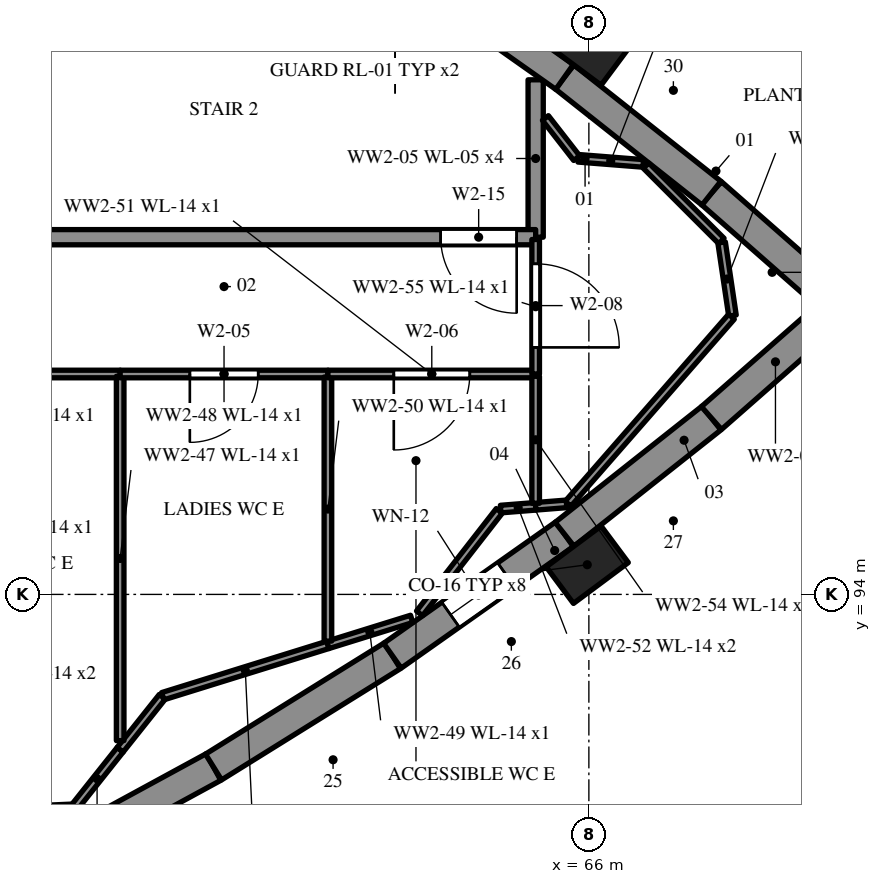
"""IFC4 building model, lengths in metres.
Left out: names, types, materials, properties, quantities, classifications, styles, units other than length and angle.
Written with IfcOpenShell. Run it as: python <this file> out.ifc"""

import sys

from ifc_helpers import new_model, si_unit, direction, frame, frame_2d, origin, origin_2d, place, context, subcontext, project, spatial, polyline, rectangle, outline, extrude, element, fill, save


model = new_model("IFC4")
c1 = context("Model", 3, precision=1e-05, world=origin(), true_north=direction((0.0, 1.0)))
c2 = subcontext(c1, "Body", "Model", "MODEL_VIEW")
j1 = project(units=[si_unit("LENGTHUNIT", "METRE"), si_unit("PLANEANGLEUNIT", "RADIAN")], contexts=[c1])
p1 = place(None, origin())
s1 = spatial("IfcSite", under=j1, at=p1, CompositionType="ELEMENT")
p2 = place(p1, origin())
s2 = spatial("IfcBuilding", under=s1, at=p2, CompositionType="ELEMENT")
p3 = place(p2, frame((0.0, 0.0, 10.2)))
s3 = spatial("IfcBuildingStorey", under=s2, at=p3, CompositionType="ELEMENT", Elevation=10.2)
p4 = place(p3, frame((65.3, 100.771, 0.0), z_axis=(0.0, 0.0, 1.0), x_axis=(0.0, -1.0, 0.0)))
e1 = element("IfcWall", 1, at=p4, inside=s3, PredefinedType="SHEAR", context=c2, shape_type="SweptSolid", body=[
    extrude(outline(polyline([(0.0, 0.0), (2.071, 0.0), (2.071, 5.912), (1.994, 5.842), (0.0, 4.028), (0.0, 0.0)])), frame((0.0, 0.1, 0.0), z_axis=(0.0, -1.0, 0.0), x_axis=(1.0, 0.0, 0.0)), (0.0, 0.0, 1.0), 0.2),
])
p5 = place(p3, frame((65.3, 98.7, 0.0), z_axis=(0.0, 0.0, 1.0), x_axis=(-1.0, 0.0, 0.0)))
e2 = element("IfcWall", 2, at=p5, inside=s3, PredefinedType="SHEAR", context=c2, shape_type="SweptSolid", body=[
    extrude(outline(polyline([(0.0, 0.0), (8.2, 0.0), (8.2, 9.679), (0.381, 5.875), (0.304, 5.911), (0.229, 5.899), (0.062, 5.861), (0.0, 5.845), (0.0, 0.0)])), frame((0.0, 0.1, 0.0), z_axis=(0.0, -1.0, 0.0), x_axis=(1.0, 0.0, 0.0)), (0.0, 0.0, 1.0), 0.2),
])
p6 = place(p5, frame((0.25, 0.0, 0.0)))
e3 = element("IfcOpeningElement", 3, at=p6, cuts=e2, PredefinedType="OPENING", context=c2, shape_type="SweptSolid", body=[
    extrude(rectangle(XDim=1.0, YDim=2.4, at=frame_2d((0.5, 1.2))), frame((0.0, 0.11, 0.0), z_axis=(0.0, -1.0, 0.0), x_axis=(1.0, 0.0, 0.0)), (0.0, 0.0, 1.0), 0.22),
])
p7 = place(p3, frame((58.627, 90.404, 0.0), z_axis=(0.0, 0.0, 1.0), x_axis=(0.878292493566, 0.478123724308, 0.0)))
e4 = element("IfcWall", 4, at=p7, inside=s3, PredefinedType="SOLIDWALL", context=c2, shape_type="SweptSolid", body=[
    extrude(outline(polyline([(0.0, 0.0), (2.772, 0.0), (2.772, 1.966), (2.734, 1.956), (2.673, 1.939), (0.0, 2.764), (0.0, 0.0)])), frame((0.0, 0.2, 0.0), z_axis=(0.0, -1.0, 0.0), x_axis=(1.0, 0.0, 0.0)), (0.0, 0.0, 1.0), 0.4),
])
p8 = place(p3, frame((61.062, 91.729, 0.0), z_axis=(0.0, 0.0, 1.0), x_axis=(0.84912946359, 0.528184772653, 0.0)))
e5 = element("IfcWall", 5, at=p8, inside=s3, PredefinedType="SOLIDWALL", context=c2, shape_type="SweptSolid", body=[
    extrude(outline(polyline([(0.0, 0.0), (2.772, 0.0), (2.772, 2.845), (2.451, 2.766), (0.525, 2.14), (0.0, 1.97), (0.0, 0.0)])), frame((0.0, 0.2, 0.0), z_axis=(0.0, -1.0, 0.0), x_axis=(1.0, 0.0, 0.0)), (0.0, 0.0, 1.0), 0.4),
])
p9 = place(p3, frame((63.415, 93.193, 0.0), z_axis=(0.0, 0.0, 1.0), x_axis=(0.817028877428, 0.576596751161, 0.0)))
e6 = element("IfcWall", 6, at=p9, inside=s3, PredefinedType="SOLIDWALL", context=c2, shape_type="SweptSolid", body=[
    extrude(outline(polyline([(0.0, 0.0), (2.772, 0.0), (2.772, 3.555), (2.744, 3.568), (2.603, 3.693), (2.462, 3.647), (0.367, 2.968), (0.0, 2.848), (0.0, 0.0)])), frame((0.0, 0.2, 0.0), z_axis=(0.0, -1.0, 0.0), x_axis=(1.0, 0.0, 0.0)), (0.0, 0.0, 1.0), 0.4),
])
p10 = place(p9, frame((0.936, 0.0, 1.6)))
e7 = element("IfcOpeningElement", 7, at=p10, cuts=e6, PredefinedType="OPENING", context=c2, shape_type="SweptSolid", body=[
    extrude(rectangle(XDim=0.9, YDim=0.6, at=frame_2d((0.45, 0.3))), frame((0.0, 0.21, 0.0), z_axis=(0.0, -1.0, 0.0), x_axis=(1.0, 0.0, 0.0)), (0.0, 0.0, 1.0), 0.42),
])
p11 = place(p3, frame((65.68, 94.792, 0.0), z_axis=(0.0, 0.0, 1.0), x_axis=(0.784278812541, 0.620408530082, 0.0)))
e8 = element("IfcWall", 8, at=p11, inside=s3, PredefinedType="SOLIDWALL", context=c2, shape_type="SweptSolid", body=[
    extrude(outline(polyline([(0.0, 0.0), (2.464, 0.0), (2.464, 2.651), (2.414, 2.669), (0.335, 3.428), (0.177, 3.486), (0.0, 3.551), (0.0, 0.0)])), frame((0.0, 0.2, 0.0), z_axis=(0.0, -1.0, 0.0), x_axis=(1.0, 0.0, 0.0)), (0.0, 0.0, 1.0), 0.4),
])
p12 = place(p3, frame((67.613, 96.32, 0.0), z_axis=(0.0, 0.0, 1.0), x_axis=(0.751212351098, 0.660060605973, 0.0)))
e9 = element("IfcWall", 9, at=p12, inside=s3, PredefinedType="SOLIDWALL", context=c2, shape_type="SweptSolid", body=[
    extrude(outline(polyline([(0.0, 0.0), (2.242, 0.0), (2.242, 1.751), (2.159, 1.784), (2.097, 1.809), (1.869, 1.901), (0.0, 2.647), (0.0, 0.0)])), frame((0.0, 0.2, 0.0), z_axis=(0.0, -1.0, 0.0), x_axis=(1.0, 0.0, 0.0)), (0.0, 0.0, 1.0), 0.4),
])
p13 = place(p3, frame((69.297, 97.8, 0.0), z_axis=(0.0, 0.0, 1.0), x_axis=(-0.751212351098, 0.660060605973, 0.0)))
e10 = element("IfcWall", 10, at=p13, inside=s3, PredefinedType="SOLIDWALL", context=c2, shape_type="SweptSolid", body=[
    extrude(outline(polyline([(0.0, 0.0), (2.242, 0.0), (2.242, 2.647), (2.202, 2.635), (0.372, 1.901), (0.145, 1.809), (0.083, 1.784), (0.0, 1.751), (0.0, 0.0)])), frame((0.0, 0.2, 0.0), z_axis=(0.0, -1.0, 0.0), x_axis=(1.0, 0.0, 0.0)), (0.0, 0.0, 1.0), 0.4),
])
p14 = place(p3, frame((67.613, 99.28, 0.0), z_axis=(0.0, 0.0, 1.0), x_axis=(-0.784278812541, 0.620408530082, 0.0)))
e11 = element("IfcWall", 11, at=p14, inside=s3, PredefinedType="SOLIDWALL", context=c2, shape_type="SweptSolid", body=[
    extrude(outline(polyline([(0.0, 0.0), (2.464, 0.0), (2.464, 3.551), (2.446, 3.544), (2.288, 3.486), (2.129, 3.428), (0.051, 2.669), (0.0, 2.651), (0.0, 0.0)])), frame((0.0, 0.2, 0.0), z_axis=(0.0, -1.0, 0.0), x_axis=(1.0, 0.0, 0.0)), (0.0, 0.0, 1.0), 0.4),
])
p15 = place(p3, frame((65.68, 100.809, 0.0), z_axis=(0.0, 0.0, 1.0), x_axis=(-0.817070367038, 0.57653795652, 0.0)))
e12 = element("IfcWall", 12, at=p15, inside=s3, PredefinedType="SOLIDWALL", context=c2, shape_type="SweptSolid", body=[
    extrude(outline(polyline([(0.0, 0.0), (2.772, 0.0), (2.772, 2.848), (2.406, 2.968), (0.311, 3.647), (0.169, 3.693), (0.0, 3.555), (0.0, 0.0)])), frame((0.0, 0.2, 0.0), z_axis=(0.0, -1.0, 0.0), x_axis=(1.0, 0.0, 0.0)), (0.0, 0.0, 1.0), 0.4),
])
for number, where, z_axis, x_axis in (
    (13, (65.979, 94.391, 0.0), (0.0, 0.0, 1.0), (0.802, 0.597, 0.0)),
    (14, (65.979, 101.209, 0.0), (0.0, 0.0, 1.0), (-0.802, 0.597, 0.0)),
):
    element("IfcColumn", number, at=place(p3, frame(where, z_axis=z_axis, x_axis=x_axis)), inside=s3, PredefinedType="PILASTER", context=c2, shape_type="SweptSolid", body=[
        extrude(rectangle(XDim=0.9, YDim=0.6, at=origin_2d()), origin(), (0.0, 0.0, 1.0), 2.507),
    ])
p16 = place(p3, frame((59.833, 91.956, 0.0), z_axis=(0.0, 0.0, 1.0), x_axis=(-0.622220537754, -0.78284200347, 0.0)))
e15 = element("IfcWall", 15, at=p16, inside=s3, PredefinedType="PARTITIONING", context=c2, shape_type="SweptSolid", body=[
    extrude(rectangle(XDim=0.976, YDim=0.1, at=frame_2d((0.488, 0.0))), origin(), (0.0, 0.0, 1.0), 2.5),
])
p17 = place(p3, frame((59.833, 96.9, 0.0), z_axis=(0.0, 0.0, 1.0), x_axis=(-1.0, 0.0, 0.0)))
e16 = element("IfcWall", 16, at=p17, inside=s3, PredefinedType="PARTITIONING", context=c2, shape_type="SweptSolid", body=[
    extrude(rectangle(XDim=2.733, YDim=0.1, at=frame_2d((1.367, 0.0))), origin(), (0.0, 0.0, 1.0), 2.5),
])
p18 = place(p17, frame((0.917, 0.0, 0.0)))
e17 = element("IfcOpeningElement", 17, at=p18, cuts=e16, PredefinedType="OPENING", context=c2, shape_type="SweptSolid", body=[
    extrude(rectangle(XDim=0.9, YDim=2.1, at=frame_2d((0.45, 1.05))), frame((0.0, 0.06, 0.0), z_axis=(0.0, -1.0, 0.0), x_axis=(1.0, 0.0, 0.0)), (0.0, 0.0, 1.0), 0.12),
])
p19 = place(p3, frame((62.567, 93.336, 0.0), z_axis=(0.0, 0.0, 1.0), x_axis=(-0.954993948464, -0.296625282802, 0.0)))
e18 = element("IfcWall", 18, at=p19, inside=s3, PredefinedType="PARTITIONING", context=c2, shape_type="SweptSolid", body=[
    extrude(rectangle(XDim=2.276, YDim=0.1, at=frame_2d((1.138, 0.0))), origin(), (0.0, 0.0, 1.0), 2.5),
])
p20 = place(p3, frame((60.387, 92.653, 0.0), z_axis=(0.0, 0.0, 1.0), x_axis=(-0.622584673897, -0.782552441584, 0.0)))
e19 = element("IfcWall", 19, at=p20, inside=s3, PredefinedType="PARTITIONING", context=c2, shape_type="SweptSolid", body=[
    extrude(rectangle(XDim=0.89, YDim=0.1, at=frame_2d((0.445, 0.0))), origin(), (0.0, 0.0, 1.0), 2.5),
])
p21 = place(p3, frame((59.833, 96.87, 0.0), z_axis=(0.0, 0.0, 1.0), x_axis=(0.0, -1.0, 0.0)))
e20 = element("IfcWall", 20, at=p21, inside=s3, PredefinedType="PARTITIONING", context=c2, shape_type="SweptSolid", body=[
    extrude(rectangle(XDim=4.794, YDim=0.1, at=frame_2d((2.397, 0.0))), origin(), (0.0, 0.0, 1.0), 2.5),
])
p22 = place(p3, frame((62.567, 96.9, 0.0), z_axis=(0.0, 0.0, 1.0), x_axis=(-1.0, 0.0, 0.0)))
e21 = element("IfcWall", 21, at=p22, inside=s3, PredefinedType="PARTITIONING", context=c2, shape_type="SweptSolid", body=[
    extrude(rectangle(XDim=2.733, YDim=0.1, at=frame_2d((1.367, 0.0))), origin(), (0.0, 0.0, 1.0), 2.5),
])
p23 = place(p22, frame((0.917, 0.0, 0.0)))
e22 = element("IfcOpeningElement", 22, at=p23, cuts=e21, PredefinedType="OPENING", context=c2, shape_type="SweptSolid", body=[
    extrude(rectangle(XDim=0.9, YDim=2.1, at=frame_2d((0.45, 1.05))), frame((0.0, 0.06, 0.0), z_axis=(0.0, -1.0, 0.0), x_axis=(1.0, 0.0, 0.0)), (0.0, 0.0, 1.0), 0.12),
])
p24 = place(p3, frame((63.669, 93.678, 0.0), z_axis=(0.0, 0.0, 1.0), x_axis=(-0.954998028135, -0.296612147861, 0.0)))
e23 = element("IfcWall", 23, at=p24, inside=s3, PredefinedType="PARTITIONING", context=c2, shape_type="SweptSolid", body=[
    extrude(rectangle(XDim=1.154, YDim=0.1, at=frame_2d((0.577, 0.0))), origin(), (0.0, 0.0, 1.0), 2.5),
])
p25 = place(p3, frame((62.567, 96.86, 0.0), z_axis=(0.0, 0.0, 1.0), x_axis=(0.0, -1.0, 0.0)))
e24 = element("IfcWall", 24, at=p25, inside=s3, PredefinedType="PARTITIONING", context=c2, shape_type="SweptSolid", body=[
    extrude(rectangle(XDim=3.474, YDim=0.1, at=frame_2d((1.737, 0.0))), origin(), (0.0, 0.0, 1.0), 2.5),
])
p26 = place(p3, frame((65.3, 96.9, 0.0), z_axis=(0.0, 0.0, 1.0), x_axis=(-1.0, 0.0, 0.0)))
e25 = element("IfcWall", 25, at=p26, inside=s3, PredefinedType="PARTITIONING", context=c2, shape_type="SweptSolid", body=[
    extrude(rectangle(XDim=2.733, YDim=0.1, at=frame_2d((1.367, 0.0))), origin(), (0.0, 0.0, 1.0), 2.5),
])
p27 = place(p26, frame((0.867, 0.0, 0.0)))
e26 = element("IfcOpeningElement", 26, at=p27, cuts=e25, PredefinedType="OPENING", context=c2, shape_type="SweptSolid", body=[
    extrude(rectangle(XDim=1.0, YDim=2.1, at=frame_2d((0.5, 1.05))), frame((0.0, 0.06, 0.0), z_axis=(0.0, -1.0, 0.0), x_axis=(1.0, 0.0, 0.0)), (0.0, 0.0, 1.0), 0.12),
])
p28 = place(p3, frame((65.3, 95.159, 0.0), z_axis=(0.0, 0.0, 1.0), x_axis=(-0.996890500496, -0.078799302161, 0.0)))
e27 = element("IfcWall", 27, at=p28, inside=s3, PredefinedType="PARTITIONING", context=c2, shape_type="SweptSolid", body=[
    extrude(rectangle(XDim=0.462, YDim=0.1, at=frame_2d((0.231, 0.0))), origin(), (0.0, 0.0, 1.0), 2.5),
])
p29 = place(p3, frame((64.822, 95.099, 0.0), z_axis=(0.0, 0.0, 1.0), x_axis=(-0.614326279965, -0.789052103314, 0.0)))
e28 = element("IfcWall", 28, at=p29, inside=s3, PredefinedType="PARTITIONING", context=c2, shape_type="SweptSolid", body=[
    extrude(rectangle(XDim=1.709, YDim=0.1, at=frame_2d((0.854, 0.0))), origin(), (0.0, 0.0, 1.0), 2.5),
])
p30 = place(p3, frame((66.752, 99.642, 0.0), z_axis=(0.0, 0.0, 1.0), x_axis=(0.707106781187, -0.707106781187, 0.0)))
e29 = element("IfcWall", 29, at=p30, inside=s3, PredefinedType="PARTITIONING", context=c2, shape_type="SweptSolid", body=[
    extrude(rectangle(XDim=1.402, YDim=0.1, at=frame_2d((0.701, 0.0))), origin(), (0.0, 0.0, 1.0), 2.5),
])
p31 = place(p3, frame((67.746, 98.631, 0.0), z_axis=(0.0, 0.0, 1.0), x_axis=(0.146903586496, -0.989150815738, 0.0)))
e30 = element("IfcWall", 30, at=p31, inside=s3, PredefinedType="PARTITIONING", context=c2, shape_type="SweptSolid", body=[
    extrude(rectangle(XDim=0.972, YDim=0.1, at=frame_2d((0.486, 0.0))), origin(), (0.0, 0.0, 1.0), 2.5),
])
p32 = place(p3, frame((67.876, 97.654, 0.0), z_axis=(0.0, 0.0, 1.0), x_axis=(-0.658039089544, -0.752983769169, 0.0)))
e31 = element("IfcWall", 31, at=p32, inside=s3, PredefinedType="PARTITIONING", context=c2, shape_type="SweptSolid", body=[
    extrude(rectangle(XDim=3.268, YDim=0.1, at=frame_2d((1.634, 0.0))), origin(), (0.0, 0.0, 1.0), 2.5),
])
p33 = place(p3, frame((65.706, 95.191, 0.0), z_axis=(0.0, 0.0, 1.0), x_axis=(-0.996857122612, -0.079220433585, 0.0)))
e32 = element("IfcWall", 32, at=p33, inside=s3, PredefinedType="PARTITIONING", context=c2, shape_type="SweptSolid", body=[
    extrude(rectangle(XDim=0.407, YDim=0.1, at=frame_2d((0.203, 0.0))), origin(), (0.0, 0.0, 1.0), 2.5),
])
p34 = place(p3, frame((65.3, 96.87, 0.0), z_axis=(0.0, 0.0, 1.0), x_axis=(0.0, -1.0, 0.0)))
e33 = element("IfcWall", 33, at=p34, inside=s3, PredefinedType="PARTITIONING", context=c2, shape_type="SweptSolid", body=[
    extrude(rectangle(XDim=1.671, YDim=0.1, at=frame_2d((0.835, 0.0))), origin(), (0.0, 0.0, 1.0), 2.5),
])
p35 = place(p3, frame((65.3, 98.67, 0.0), z_axis=(0.0, 0.0, 1.0), x_axis=(0.0, -1.0, 0.0)))
e34 = element("IfcWall", 34, at=p35, inside=s3, PredefinedType="PARTITIONING", context=c2, shape_type="SweptSolid", body=[
    extrude(rectangle(XDim=1.77, YDim=0.1, at=frame_2d((0.885, 0.0))), origin(), (0.0, 0.0, 1.0), 2.5),
])
p36 = place(p35, frame((0.32, 0.0, 0.0)))
e35 = element("IfcOpeningElement", 35, at=p36, cuts=e34, PredefinedType="OPENING", context=c2, shape_type="SweptSolid", body=[
    extrude(rectangle(XDim=1.1, YDim=2.1, at=frame_2d((0.55, 1.05))), frame((0.0, 0.06, 0.0), z_axis=(0.0, -1.0, 0.0), x_axis=(1.0, 0.0, 0.0)), (0.0, 0.0, 1.0), 0.12),
])
p37 = place(p3, frame((65.428, 100.269, 0.0), z_axis=(0.0, 0.0, 1.0), x_axis=(0.614419858807, -0.788979237435, 0.0)))
e36 = element("IfcWall", 36, at=p37, inside=s3, PredefinedType="PARTITIONING", context=c2, shape_type="SweptSolid", body=[
    extrude(rectangle(XDim=0.67, YDim=0.1, at=frame_2d((0.335, 0.0))), origin(), (0.0, 0.0, 1.0), 2.5),
])
p38 = place(p3, frame((65.86, 99.738, 0.0), z_axis=(0.0, 0.0, 1.0), x_axis=(0.996891685656, -0.078784307254, 0.0)))
e37 = element("IfcWall", 37, at=p38, inside=s3, PredefinedType="PARTITIONING", context=c2, shape_type="SweptSolid", body=[
    extrude(rectangle(XDim=0.858, YDim=0.1, at=frame_2d((0.429, 0.0))), origin(), (0.0, 0.0, 1.0), 2.5),
])
p39 = place(p10, origin())
e38 = element("IfcWindow", 38, at=p39, inside=s3, PartitioningType="SINGLE_PANEL", PredefinedType="WINDOW", context=c2, shape_type="SweptSolid", body=[
    extrude(rectangle(XDim=0.9, YDim=0.6, at=frame_2d((0.45, 0.3))), frame((0.0, 0.03, 0.0), z_axis=(0.0, -1.0, 0.0), x_axis=(1.0, 0.0, 0.0)), (0.0, 0.0, 1.0), 0.06),
])
fill(e7, e38)
p40 = place(p23, origin())
e39 = element("IfcDoor", 39, at=p40, inside=s3, OperationType="SINGLE_SWING_RIGHT", PredefinedType="DOOR", context=c2, shape_type="SweptSolid", body=[
    extrude(rectangle(XDim=0.9, YDim=2.1, at=frame_2d((0.45, 1.05))), frame((0.0, 0.025, 0.0), z_axis=(0.0, -1.0, 0.0), x_axis=(1.0, 0.0, 0.0)), (0.0, 0.0, 1.0), 0.05),
])
fill(e22, e39)
p41 = place(p27, origin())
e40 = element("IfcDoor", 40, at=p41, inside=s3, OperationType="SINGLE_SWING_RIGHT", PredefinedType="DOOR", context=c2, shape_type="SweptSolid", body=[
    extrude(rectangle(XDim=1.0, YDim=2.1, at=frame_2d((0.5, 1.05))), frame((0.0, 0.025, 0.0), z_axis=(0.0, -1.0, 0.0), x_axis=(1.0, 0.0, 0.0)), (0.0, 0.0, 1.0), 0.05),
])
fill(e26, e40)
p42 = place(p36, origin())
e41 = element("IfcDoor", 41, at=p42, inside=s3, OperationType="SINGLE_SWING_RIGHT", PredefinedType="DOOR", context=c2, shape_type="SweptSolid", body=[
    extrude(rectangle(XDim=1.1, YDim=2.1, at=frame_2d((0.55, 1.05))), frame((0.0, 0.025, 0.0), z_axis=(0.0, -1.0, 0.0), x_axis=(1.0, 0.0, 0.0)), (0.0, 0.0, 1.0), 0.05),
])
fill(e35, e41)
p43 = place(p6, origin())
e42 = element("IfcDoor", 42, at=p43, inside=s3, OperationType="SINGLE_SWING_LEFT", PredefinedType="DOOR", context=c2, shape_type="SweptSolid", body=[
    extrude(rectangle(XDim=1.0, YDim=2.4, at=frame_2d((0.5, 1.2))), frame((0.0, 0.025, 0.0), z_axis=(0.0, -1.0, 0.0), x_axis=(1.0, 0.0, 0.0)), (0.0, 0.0, 1.0), 0.05),
])
fill(e3, e42)
save(model, sys.argv[1])
